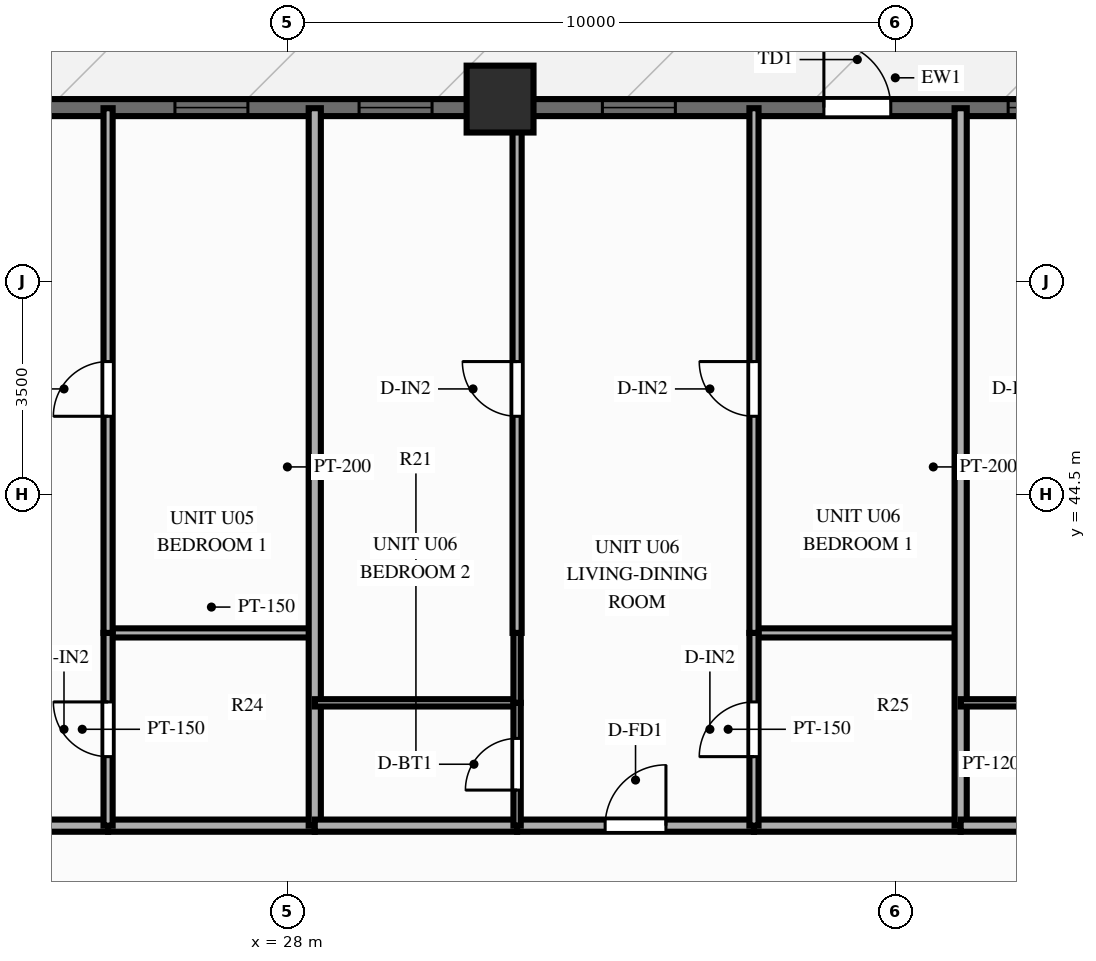
"""IFC4 building model, lengths in metres.
Left out: names, types, materials, properties, quantities, classifications, styles, units other than length and angle.
Written with IfcOpenShell. Run it as: python <this file> out.ifc"""

import sys

from ifc_helpers import new_model, si_unit, direction, frame, frame_2d, origin, origin_2d, place, context, subcontext, project, spatial, rectangle, extrude, source, transform, mapped, element, fill, save


model = new_model("IFC4")
c1 = context("Model", 3, precision=1e-05, world=origin(), true_north=direction((0.0, 1.0)))
c2 = subcontext(c1, "Body", "Model", "MODEL_VIEW")
j1 = project(units=[si_unit("LENGTHUNIT", "METRE"), si_unit("PLANEANGLEUNIT", "RADIAN")], contexts=[c1])
p1 = place(None, origin())
s1 = spatial("IfcSite", under=j1, at=p1, CompositionType="ELEMENT")
p2 = place(p1, origin())
s2 = spatial("IfcBuilding", under=s1, at=p2, CompositionType="ELEMENT")
p3 = place(p2, frame((0.0, 0.0, 34.4)))
s3 = spatial("IfcBuildingStorey", under=s2, at=p3, CompositionType="ELEMENT", Elevation=34.4)
m1 = source(origin(), c2, "Body", "SweptSolid", [
    extrude(rectangle(XDim=1.1, YDim=1.1, at=origin_2d()), origin(), (0.0, 0.0, 1.0), 3.0),
])
p4 = place(p3, frame((31.5, 51.0, 0.0), z_axis=(0.0, 0.0, 1.0), x_axis=(1.0, 0.0, 0.0)))
e1 = element("IfcColumn", 1, at=p4, inside=s3, PredefinedType="COLUMN", context=c2, shape_type="MappedRepresentation", body=[
    mapped(m1, transform((0.0, 0.0, 0.0), scale=1.0)),
])
p5 = place(p3, frame((15.5, 50.86, 0.0), z_axis=(0.0, 0.0, 1.0), x_axis=(1.0, 0.0, 0.0)))
e2 = element("IfcWall", 2, at=p5, inside=s3, PredefinedType="SOLIDWALL", context=c2, shape_type="SweptSolid", body=[
    extrude(rectangle(XDim=45.0, YDim=0.28, at=frame_2d((22.5, 0.0))), origin(), (0.0, 0.0, 1.0), 2.28),
])
p6 = place(p5, frame((0.76, 0.0, 0.25)))
e3 = element("IfcOpeningElement", 3, at=p6, cuts=e2, PredefinedType="OPENING", context=c2, shape_type="SweptSolid", body=[
    extrude(rectangle(XDim=1.2, YDim=1.5, at=frame_2d((0.6, 0.75))), frame((0.0, 0.152, 0.0), z_axis=(0.0, -1.0, 0.0), x_axis=(1.0, 0.0, 0.0)), (0.0, 0.0, 1.0), 0.304),
])
p7 = place(p5, frame((3.111, 0.0, 0.25)))
e4 = element("IfcOpeningElement", 4, at=p7, cuts=e2, PredefinedType="OPENING", context=c2, shape_type="SweptSolid", body=[
    extrude(rectangle(XDim=1.2, YDim=1.5, at=frame_2d((0.6, 0.75))), frame((0.0, 0.152, 0.0), z_axis=(0.0, -1.0, 0.0), x_axis=(1.0, 0.0, 0.0)), (0.0, 0.0, 1.0), 0.304),
])
p8 = place(p5, frame((6.723, 0.0, 0.25)))
e5 = element("IfcOpeningElement", 5, at=p8, cuts=e2, PredefinedType="OPENING", context=c2, shape_type="SweptSolid", body=[
    extrude(rectangle(XDim=1.2, YDim=1.5, at=frame_2d((0.6, 0.75))), frame((0.0, 0.152, 0.0), z_axis=(0.0, -1.0, 0.0), x_axis=(1.0, 0.0, 0.0)), (0.0, 0.0, 1.0), 0.304),
])
p9 = place(p5, frame((10.653, 0.0, 0.25)))
e6 = element("IfcOpeningElement", 6, at=p9, cuts=e2, PredefinedType="OPENING", context=c2, shape_type="SweptSolid", body=[
    extrude(rectangle(XDim=1.2, YDim=1.5, at=frame_2d((0.6, 0.75))), frame((0.0, 0.152, 0.0), z_axis=(0.0, -1.0, 0.0), x_axis=(1.0, 0.0, 0.0)), (0.0, 0.0, 1.0), 0.304),
])
p10 = place(p5, frame((13.681, 0.0, 0.25)))
e7 = element("IfcOpeningElement", 7, at=p10, cuts=e2, PredefinedType="OPENING", context=c2, shape_type="SweptSolid", body=[
    extrude(rectangle(XDim=1.2, YDim=1.5, at=frame_2d((0.6, 0.75))), frame((0.0, 0.152, 0.0), z_axis=(0.0, -1.0, 0.0), x_axis=(1.0, 0.0, 0.0)), (0.0, 0.0, 1.0), 0.304),
])
p11 = place(p5, frame((17.683, 0.0, 0.25)))
e8 = element("IfcOpeningElement", 8, at=p11, cuts=e2, PredefinedType="OPENING", context=c2, shape_type="SweptSolid", body=[
    extrude(rectangle(XDim=1.2, YDim=1.5, at=frame_2d((0.6, 0.75))), frame((0.0, 0.152, 0.0), z_axis=(0.0, -1.0, 0.0), x_axis=(1.0, 0.0, 0.0)), (0.0, 0.0, 1.0), 0.304),
])
p12 = place(p5, frame((21.325, 0.0, 0.0)))
e9 = element("IfcOpeningElement", 9, at=p12, cuts=e2, PredefinedType="OPENING", context=c2, shape_type="SweptSolid", body=[
    extrude(rectangle(XDim=1.1, YDim=2.15, at=frame_2d((0.55, 1.075))), frame((0.0, 0.152, 0.0), z_axis=(0.0, -1.0, 0.0), x_axis=(1.0, 0.0, 0.0)), (0.0, 0.0, 1.0), 0.304),
])
p13 = place(p5, frame((24.356, 0.0, 0.25)))
e10 = element("IfcOpeningElement", 10, at=p13, cuts=e2, PredefinedType="OPENING", context=c2, shape_type="SweptSolid", body=[
    extrude(rectangle(XDim=1.2, YDim=1.5, at=frame_2d((0.6, 0.75))), frame((0.0, 0.152, 0.0), z_axis=(0.0, -1.0, 0.0), x_axis=(1.0, 0.0, 0.0)), (0.0, 0.0, 1.0), 0.304),
])
p14 = place(p5, frame((26.873, 0.0, 0.25)))
e11 = element("IfcOpeningElement", 11, at=p14, cuts=e2, PredefinedType="OPENING", context=c2, shape_type="SweptSolid", body=[
    extrude(rectangle(XDim=1.2, YDim=1.5, at=frame_2d((0.6, 0.75))), frame((0.0, 0.152, 0.0), z_axis=(0.0, -1.0, 0.0), x_axis=(1.0, 0.0, 0.0)), (0.0, 0.0, 1.0), 0.304),
])
p15 = place(p5, frame((29.744, 0.0, 0.25)))
e12 = element("IfcOpeningElement", 12, at=p15, cuts=e2, PredefinedType="OPENING", context=c2, shape_type="SweptSolid", body=[
    extrude(rectangle(XDim=0.7, YDim=1.5, at=frame_2d((0.35, 0.75))), frame((0.0, 0.152, 0.0), z_axis=(0.0, -1.0, 0.0), x_axis=(1.0, 0.0, 0.0)), (0.0, 0.0, 1.0), 0.304),
])
p16 = place(p5, frame((31.898, 0.0, 0.25)))
e13 = element("IfcOpeningElement", 13, at=p16, cuts=e2, PredefinedType="OPENING", context=c2, shape_type="SweptSolid", body=[
    extrude(rectangle(XDim=1.2, YDim=1.5, at=frame_2d((0.6, 0.75))), frame((0.0, 0.152, 0.0), z_axis=(0.0, -1.0, 0.0), x_axis=(1.0, 0.0, 0.0)), (0.0, 0.0, 1.0), 0.304),
])
p17 = place(p5, frame((34.979, 0.0, 0.25)))
e14 = element("IfcOpeningElement", 14, at=p17, cuts=e2, PredefinedType="OPENING", context=c2, shape_type="SweptSolid", body=[
    extrude(rectangle(XDim=1.2, YDim=1.5, at=frame_2d((0.6, 0.75))), frame((0.0, 0.152, 0.0), z_axis=(0.0, -1.0, 0.0), x_axis=(1.0, 0.0, 0.0)), (0.0, 0.0, 1.0), 0.304),
])
p18 = place(p5, frame((38.59, 0.0, 0.25)))
e15 = element("IfcOpeningElement", 15, at=p18, cuts=e2, PredefinedType="OPENING", context=c2, shape_type="SweptSolid", body=[
    extrude(rectangle(XDim=1.2, YDim=1.5, at=frame_2d((0.6, 0.75))), frame((0.0, 0.152, 0.0), z_axis=(0.0, -1.0, 0.0), x_axis=(1.0, 0.0, 0.0)), (0.0, 0.0, 1.0), 0.304),
])
p19 = place(p5, frame((42.415, 0.0, 0.25)))
e16 = element("IfcOpeningElement", 16, at=p19, cuts=e2, PredefinedType="OPENING", context=c2, shape_type="SweptSolid", body=[
    extrude(rectangle(XDim=1.2, YDim=1.5, at=frame_2d((0.6, 0.75))), frame((0.0, 0.152, 0.0), z_axis=(0.0, -1.0, 0.0), x_axis=(1.0, 0.0, 0.0)), (0.0, 0.0, 1.0), 0.304),
])
p20 = place(p3, frame((20.592, 39.05, 0.0), z_axis=(0.0, 0.0, 1.0), x_axis=(1.0, 0.0, 0.0)))
e17 = element("IfcWall", 17, at=p20, inside=s3, PredefinedType="PARTITIONING", context=c2, shape_type="SweptSolid", body=[
    extrude(rectangle(XDim=4.461, YDim=0.2, at=frame_2d((2.231, 0.0))), origin(), (0.0, 0.0, 1.0), 2.79),
])
p21 = place(p20, frame((1.731, 0.0, 0.0)))
e18 = element("IfcOpeningElement", 18, at=p21, cuts=e17, PredefinedType="OPENING", context=c2, shape_type="SweptSolid", body=[
    extrude(rectangle(XDim=1.0, YDim=2.15, at=frame_2d((0.5, 1.075))), frame((0.0, 0.112, 0.0), z_axis=(0.0, -1.0, 0.0), x_axis=(1.0, 0.0, 0.0)), (0.0, 0.0, 1.0), 0.224),
])
p22 = place(p3, frame((25.053, 39.05, 0.0), z_axis=(0.0, 0.0, 1.0), x_axis=(1.0, 0.0, 0.0)))
e19 = element("IfcWall", 19, at=p22, inside=s3, PredefinedType="PARTITIONING", context=c2, shape_type="SweptSolid", body=[
    extrude(rectangle(XDim=3.399, YDim=0.2, at=frame_2d((1.7, 0.0))), origin(), (0.0, 0.0, 1.0), 2.79),
])
p23 = place(p3, frame((25.053, 42.22, 0.0), z_axis=(0.0, 0.0, 1.0), x_axis=(1.0, 0.0, 0.0)))
e20 = element("IfcWall", 20, at=p23, inside=s3, PredefinedType="PARTITIONING", context=c2, shape_type="SweptSolid", body=[
    extrude(rectangle(XDim=3.399, YDim=0.15, at=frame_2d((1.7, 0.0))), origin(), (0.0, 0.0, 1.0), 2.79),
])
p24 = place(p3, frame((25.053, 39.05, 0.0), z_axis=(0.0, 0.0, 1.0), x_axis=(0.0, 1.0, 0.0)))
e21 = element("IfcWall", 21, at=p24, inside=s3, PredefinedType="PARTITIONING", context=c2, shape_type="SweptSolid", body=[
    extrude(rectangle(XDim=3.17, YDim=0.15, at=frame_2d((1.585, 0.0))), origin(), (0.0, 0.0, 1.0), 2.79),
])
p25 = place(p24, frame((1.135, 0.0, 0.0)))
e22 = element("IfcOpeningElement", 22, at=p25, cuts=e21, PredefinedType="OPENING", context=c2, shape_type="SweptSolid", body=[
    extrude(rectangle(XDim=0.9, YDim=2.1, at=frame_2d((0.45, 1.05))), frame((0.0, 0.087, 0.0), z_axis=(0.0, -1.0, 0.0), x_axis=(1.0, 0.0, 0.0)), (0.0, 0.0, 1.0), 0.174),
])
p26 = place(p3, frame((25.053, 42.22, 0.0), z_axis=(0.0, 0.0, 1.0), x_axis=(0.0, 1.0, 0.0)))
e23 = element("IfcWall", 23, at=p26, inside=s3, PredefinedType="PARTITIONING", context=c2, shape_type="SweptSolid", body=[
    extrude(rectangle(XDim=8.63, YDim=0.15, at=frame_2d((4.315, 0.0))), origin(), (0.0, 0.0, 1.0), 2.79),
])
p27 = place(p26, frame((3.563, 0.0, 0.0)))
e24 = element("IfcOpeningElement", 24, at=p27, cuts=e23, PredefinedType="OPENING", context=c2, shape_type="SweptSolid", body=[
    extrude(rectangle(XDim=0.9, YDim=2.1, at=frame_2d((0.45, 1.05))), frame((0.0, 0.087, 0.0), z_axis=(0.0, -1.0, 0.0), x_axis=(1.0, 0.0, 0.0)), (0.0, 0.0, 1.0), 0.174),
])
p28 = place(p3, frame((28.452, 39.05, 0.0), z_axis=(0.0, 0.0, 1.0), x_axis=(0.0, 1.0, 0.0)))
e25 = element("IfcWall", 25, at=p28, inside=s3, PredefinedType="PARTITIONING", context=c2, shape_type="SweptSolid", body=[
    extrude(rectangle(XDim=11.8, YDim=0.2, at=frame_2d((5.9, 0.0))), origin(), (0.0, 0.0, 1.0), 2.79),
])
p29 = place(p3, frame((28.452, 39.05, 0.0), z_axis=(0.0, 0.0, 1.0), x_axis=(1.0, 0.0, 0.0)))
e26 = element("IfcWall", 26, at=p29, inside=s3, PredefinedType="PARTITIONING", context=c2, shape_type="SweptSolid", body=[
    extrude(rectangle(XDim=3.328, YDim=0.2, at=frame_2d((1.664, 0.0))), origin(), (0.0, 0.0, 1.0), 2.79),
])
p30 = place(p3, frame((31.78, 39.05, 0.0), z_axis=(0.0, 0.0, 1.0), x_axis=(1.0, 0.0, 0.0)))
e27 = element("IfcWall", 27, at=p30, inside=s3, PredefinedType="PARTITIONING", context=c2, shape_type="SweptSolid", body=[
    extrude(rectangle(XDim=3.896, YDim=0.2, at=frame_2d((1.948, 0.0))), origin(), (0.0, 0.0, 1.0), 2.79),
])
p31 = place(p30, frame((1.448, 0.0, 0.0)))
e28 = element("IfcOpeningElement", 28, at=p31, cuts=e27, PredefinedType="OPENING", context=c2, shape_type="SweptSolid", body=[
    extrude(rectangle(XDim=1.0, YDim=2.15, at=frame_2d((0.5, 1.075))), frame((0.0, 0.112, 0.0), z_axis=(0.0, -1.0, 0.0), x_axis=(1.0, 0.0, 0.0)), (0.0, 0.0, 1.0), 0.224),
])
p32 = place(p3, frame((35.676, 39.05, 0.0), z_axis=(0.0, 0.0, 1.0), x_axis=(1.0, 0.0, 0.0)))
e29 = element("IfcWall", 29, at=p32, inside=s3, PredefinedType="PARTITIONING", context=c2, shape_type="SweptSolid", body=[
    extrude(rectangle(XDim=3.399, YDim=0.2, at=frame_2d((1.7, 0.0))), origin(), (0.0, 0.0, 1.0), 2.79),
])
p33 = place(p3, frame((28.452, 41.07, 0.0), z_axis=(0.0, 0.0, 1.0), x_axis=(1.0, 0.0, 0.0)))
e30 = element("IfcWall", 30, at=p33, inside=s3, PredefinedType="PARTITIONING", context=c2, shape_type="SweptSolid", body=[
    extrude(rectangle(XDim=3.328, YDim=0.12, at=frame_2d((1.664, 0.0))), origin(), (0.0, 0.0, 1.0), 2.79),
])
p34 = place(p3, frame((35.676, 42.22, 0.0), z_axis=(0.0, 0.0, 1.0), x_axis=(1.0, 0.0, 0.0)))
e31 = element("IfcWall", 31, at=p34, inside=s3, PredefinedType="PARTITIONING", context=c2, shape_type="SweptSolid", body=[
    extrude(rectangle(XDim=3.399, YDim=0.15, at=frame_2d((1.7, 0.0))), origin(), (0.0, 0.0, 1.0), 2.79),
])
p35 = place(p3, frame((31.78, 39.05, 0.0), z_axis=(0.0, 0.0, 1.0), x_axis=(0.0, 1.0, 0.0)))
e32 = element("IfcWall", 32, at=p35, inside=s3, PredefinedType="PARTITIONING", context=c2, shape_type="SweptSolid", body=[
    extrude(rectangle(XDim=2.02, YDim=0.12, at=frame_2d((1.01, 0.0))), origin(), (0.0, 0.0, 1.0), 2.79),
])
p36 = place(p35, frame((0.585, 0.0, 0.0)))
e33 = element("IfcOpeningElement", 33, at=p36, cuts=e32, PredefinedType="OPENING", context=c2, shape_type="SweptSolid", body=[
    extrude(rectangle(XDim=0.85, YDim=2.05, at=frame_2d((0.425, 1.025))), frame((0.0, 0.072, 0.0), z_axis=(0.0, -1.0, 0.0), x_axis=(1.0, 0.0, 0.0)), (0.0, 0.0, 1.0), 0.144),
])
p37 = place(p3, frame((31.78, 41.07, 0.0), z_axis=(0.0, 0.0, 1.0), x_axis=(0.0, 1.0, 0.0)))
e34 = element("IfcWall", 34, at=p37, inside=s3, PredefinedType="PARTITIONING", context=c2, shape_type="SweptSolid", body=[
    extrude(rectangle(XDim=1.15, YDim=0.12, at=frame_2d((0.575, 0.0))), origin(), (0.0, 0.0, 1.0), 2.79),
])
p38 = place(p3, frame((31.78, 42.22, 0.0), z_axis=(0.0, 0.0, 1.0), x_axis=(0.0, 1.0, 0.0)))
e35 = element("IfcWall", 35, at=p38, inside=s3, PredefinedType="PARTITIONING", context=c2, shape_type="SweptSolid", body=[
    extrude(rectangle(XDim=8.63, YDim=0.15, at=frame_2d((4.315, 0.0))), origin(), (0.0, 0.0, 1.0), 2.79),
])
p39 = place(p38, frame((3.563, 0.0, 0.0)))
e36 = element("IfcOpeningElement", 36, at=p39, cuts=e35, PredefinedType="OPENING", context=c2, shape_type="SweptSolid", body=[
    extrude(rectangle(XDim=0.9, YDim=2.1, at=frame_2d((0.45, 1.05))), frame((0.0, 0.087, 0.0), z_axis=(0.0, -1.0, 0.0), x_axis=(1.0, 0.0, 0.0)), (0.0, 0.0, 1.0), 0.174),
])
p40 = place(p3, frame((35.676, 39.05, 0.0), z_axis=(0.0, 0.0, 1.0), x_axis=(0.0, 1.0, 0.0)))
e37 = element("IfcWall", 37, at=p40, inside=s3, PredefinedType="PARTITIONING", context=c2, shape_type="SweptSolid", body=[
    extrude(rectangle(XDim=3.17, YDim=0.15, at=frame_2d((1.585, 0.0))), origin(), (0.0, 0.0, 1.0), 2.79),
])
p41 = place(p40, frame((1.135, 0.0, 0.0)))
e38 = element("IfcOpeningElement", 38, at=p41, cuts=e37, PredefinedType="OPENING", context=c2, shape_type="SweptSolid", body=[
    extrude(rectangle(XDim=0.9, YDim=2.1, at=frame_2d((0.45, 1.05))), frame((0.0, 0.087, 0.0), z_axis=(0.0, -1.0, 0.0), x_axis=(1.0, 0.0, 0.0)), (0.0, 0.0, 1.0), 0.174),
])
p42 = place(p3, frame((35.676, 42.22, 0.0), z_axis=(0.0, 0.0, 1.0), x_axis=(0.0, 1.0, 0.0)))
e39 = element("IfcWall", 39, at=p42, inside=s3, PredefinedType="PARTITIONING", context=c2, shape_type="SweptSolid", body=[
    extrude(rectangle(XDim=8.63, YDim=0.15, at=frame_2d((4.315, 0.0))), origin(), (0.0, 0.0, 1.0), 2.79),
])
p43 = place(p42, frame((3.563, 0.0, 0.0)))
e40 = element("IfcOpeningElement", 40, at=p43, cuts=e39, PredefinedType="OPENING", context=c2, shape_type="SweptSolid", body=[
    extrude(rectangle(XDim=0.9, YDim=2.1, at=frame_2d((0.45, 1.05))), frame((0.0, 0.087, 0.0), z_axis=(0.0, -1.0, 0.0), x_axis=(1.0, 0.0, 0.0)), (0.0, 0.0, 1.0), 0.174),
])
p44 = place(p3, frame((39.075, 39.05, 0.0), z_axis=(0.0, 0.0, 1.0), x_axis=(0.0, 1.0, 0.0)))
e41 = element("IfcWall", 41, at=p44, inside=s3, PredefinedType="PARTITIONING", context=c2, shape_type="SweptSolid", body=[
    extrude(rectangle(XDim=11.8, YDim=0.2, at=frame_2d((5.9, 0.0))), origin(), (0.0, 0.0, 1.0), 2.79),
])
p45 = place(p3, frame((39.075, 39.05, 0.0), z_axis=(0.0, 0.0, 1.0), x_axis=(1.0, 0.0, 0.0)))
e42 = element("IfcWall", 42, at=p45, inside=s3, PredefinedType="PARTITIONING", context=c2, shape_type="SweptSolid", body=[
    extrude(rectangle(XDim=2.762, YDim=0.2, at=frame_2d((1.381, 0.0))), origin(), (0.0, 0.0, 1.0), 2.79),
])
p46 = place(p3, frame((39.075, 41.07, 0.0), z_axis=(0.0, 0.0, 1.0), x_axis=(1.0, 0.0, 0.0)))
e43 = element("IfcWall", 43, at=p46, inside=s3, PredefinedType="PARTITIONING", context=c2, shape_type="SweptSolid", body=[
    extrude(rectangle(XDim=2.762, YDim=0.12, at=frame_2d((1.381, 0.0))), origin(), (0.0, 0.0, 1.0), 2.79),
])
m2 = source(origin(), c2, "Body", "SweptSolid", [
    extrude(rectangle(XDim=1.2, YDim=1.5, at=frame_2d((0.6, 0.75))), frame((0.0, 0.03, 0.0), z_axis=(0.0, -1.0, 0.0), x_axis=(1.0, 0.0, 0.0)), (0.0, 0.0, 1.0), 0.06),
])
p47 = place(p9, origin())
e44 = element("IfcWindow", 44, at=p47, inside=s3, PartitioningType="SINGLE_PANEL", PredefinedType="WINDOW", context=c2, shape_type="MappedRepresentation", body=[
    mapped(m2, transform((0.0, 0.0, 0.0), scale=1.0)),
])
fill(e6, e44)
p48 = place(p10, origin())
e45 = element("IfcWindow", 45, at=p48, inside=s3, PartitioningType="SINGLE_PANEL", PredefinedType="WINDOW", context=c2, shape_type="MappedRepresentation", body=[
    mapped(m2, transform((0.0, 0.0, 0.0), scale=1.0)),
])
fill(e7, e45)
p49 = place(p11, origin())
e46 = element("IfcWindow", 46, at=p49, inside=s3, PartitioningType="SINGLE_PANEL", PredefinedType="WINDOW", context=c2, shape_type="MappedRepresentation", body=[
    mapped(m2, transform((0.0, 0.0, 0.0), scale=1.0)),
])
fill(e8, e46)
m3 = source(origin(), c2, "Body", "SweptSolid", [
    extrude(rectangle(XDim=1.1, YDim=2.15, at=frame_2d((0.55, 1.075))), frame((0.0, 0.025, 0.0), z_axis=(0.0, -1.0, 0.0), x_axis=(1.0, 0.0, 0.0)), (0.0, 0.0, 1.0), 0.05),
])
p50 = place(p12, origin())
e47 = element("IfcDoor", 47, at=p50, inside=s3, OperationType="SINGLE_SWING_LEFT", PredefinedType="DOOR", context=c2, shape_type="MappedRepresentation", body=[
    mapped(m3, transform((0.0, 0.0, 0.0), scale=1.0)),
])
fill(e9, e47)
p51 = place(p13, origin())
e48 = element("IfcWindow", 48, at=p51, inside=s3, PartitioningType="SINGLE_PANEL", PredefinedType="WINDOW", context=c2, shape_type="MappedRepresentation", body=[
    mapped(m2, transform((0.0, 0.0, 0.0), scale=1.0)),
])
fill(e10, e48)
m4 = source(origin(), c2, "Body", "SweptSolid", [
    extrude(rectangle(XDim=0.9, YDim=2.1, at=frame_2d((0.45, 1.05))), frame((0.0, 0.025, 0.0), z_axis=(0.0, -1.0, 0.0), x_axis=(1.0, 0.0, 0.0)), (0.0, 0.0, 1.0), 0.05),
])
p52 = place(p25, origin())
e49 = element("IfcDoor", 49, at=p52, inside=s3, OperationType="SINGLE_SWING_RIGHT", PredefinedType="DOOR", context=c2, shape_type="MappedRepresentation", body=[
    mapped(m4, transform((0.0, 0.0, 0.0), scale=1.0)),
])
fill(e22, e49)
p53 = place(p27, origin())
e50 = element("IfcDoor", 50, at=p53, inside=s3, OperationType="SINGLE_SWING_LEFT", PredefinedType="DOOR", context=c2, shape_type="MappedRepresentation", body=[
    mapped(m4, transform((0.0, 0.0, 0.0), scale=1.0)),
])
fill(e24, e50)
m5 = source(origin(), c2, "Body", "SweptSolid", [
    extrude(rectangle(XDim=1.0, YDim=2.15, at=frame_2d((0.5, 1.075))), frame((0.0, 0.025, 0.0), z_axis=(0.0, -1.0, 0.0), x_axis=(1.0, 0.0, 0.0)), (0.0, 0.0, 1.0), 0.05),
])
p54 = place(p31, origin())
e51 = element("IfcDoor", 51, at=p54, inside=s3, OperationType="SINGLE_SWING_RIGHT", PredefinedType="DOOR", context=c2, shape_type="MappedRepresentation", body=[
    mapped(m5, transform((0.0, 0.0, 0.0), scale=1.0)),
])
fill(e28, e51)
m6 = source(origin(), c2, "Body", "SweptSolid", [
    extrude(rectangle(XDim=0.85, YDim=2.05, at=frame_2d((0.425, 1.025))), frame((0.0, 0.025, 0.0), z_axis=(0.0, -1.0, 0.0), x_axis=(1.0, 0.0, 0.0)), (0.0, 0.0, 1.0), 0.05),
])
p55 = place(p36, origin())
e52 = element("IfcDoor", 52, at=p55, inside=s3, OperationType="SINGLE_SWING_LEFT", PredefinedType="DOOR", context=c2, shape_type="MappedRepresentation", body=[
    mapped(m6, transform((0.0, 0.0, 0.0), scale=1.0)),
])
fill(e33, e52)
p56 = place(p39, origin())
e53 = element("IfcDoor", 53, at=p56, inside=s3, OperationType="SINGLE_SWING_RIGHT", PredefinedType="DOOR", context=c2, shape_type="MappedRepresentation", body=[
    mapped(m4, transform((0.0, 0.0, 0.0), scale=1.0)),
])
fill(e36, e53)
p57 = place(p41, origin())
e54 = element("IfcDoor", 54, at=p57, inside=s3, OperationType="SINGLE_SWING_LEFT", PredefinedType="DOOR", context=c2, shape_type="MappedRepresentation", body=[
    mapped(m4, transform((0.0, 0.0, 0.0), scale=1.0)),
])
fill(e38, e54)
p58 = place(p43, origin())
e55 = element("IfcDoor", 55, at=p58, inside=s3, OperationType="SINGLE_SWING_RIGHT", PredefinedType="DOOR", context=c2, shape_type="MappedRepresentation", body=[
    mapped(m4, transform((0.0, 0.0, 0.0), scale=1.0)),
])
fill(e40, e55)
save(model, sys.argv[1])
